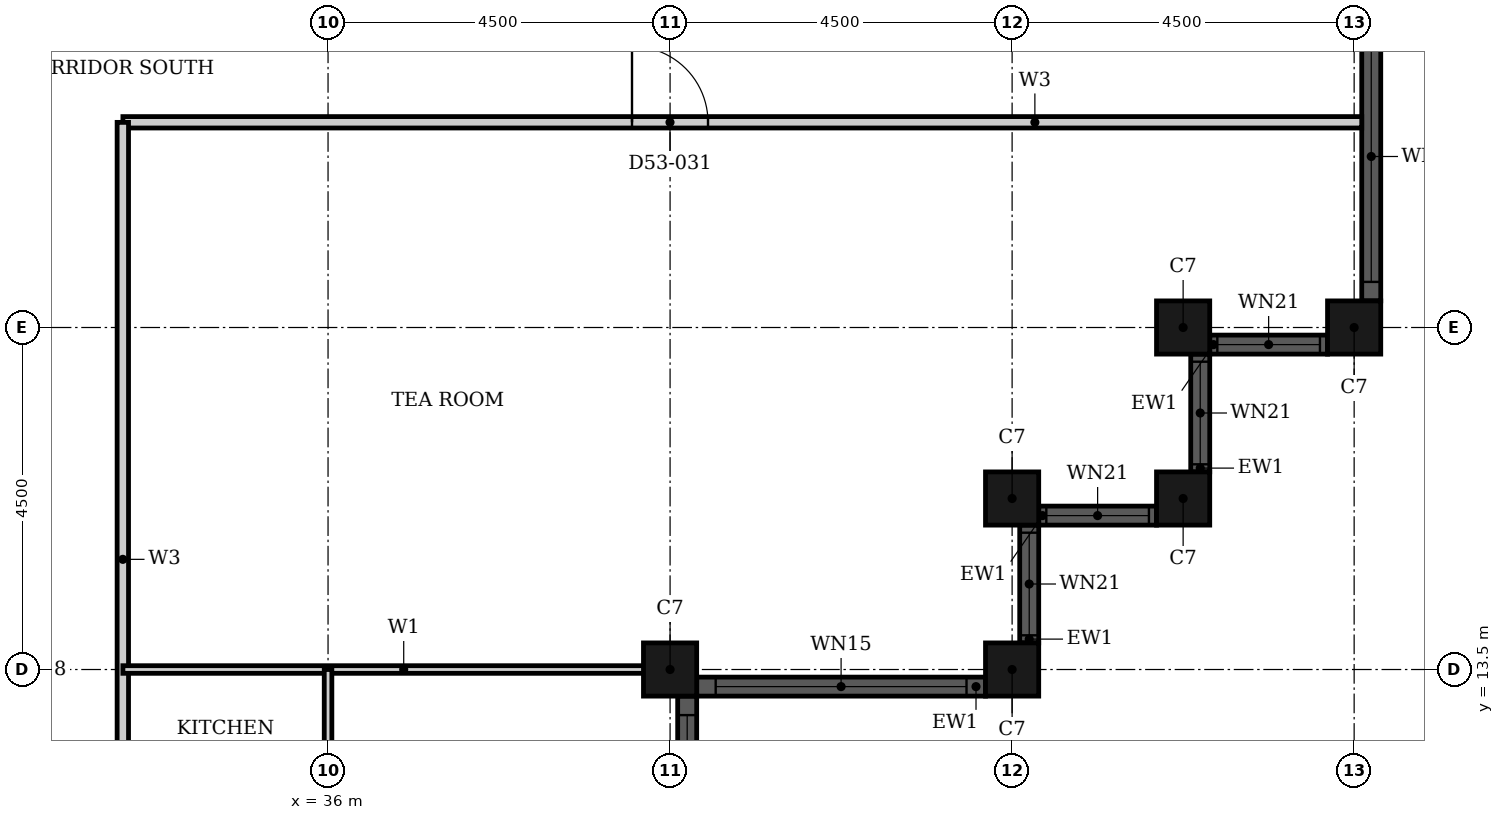
"""IFC4 building model, lengths in metres.
Left out: names, types, materials, properties, quantities, classifications, styles, units other than length and angle.
Written with IfcOpenShell. Run it as: python <this file> out.ifc"""

import sys

from ifc_helpers import new_model, si_unit, direction, frame, frame_2d, origin, origin_2d, place, context, subcontext, project, spatial, rectangle, hollow_rectangle, extrude, element, fill, save


model = new_model("IFC4")
c1 = context("Model", 3, precision=1e-05, world=origin(), true_north=direction((0.0, 1.0)))
c2 = subcontext(c1, "Body", "Model", "MODEL_VIEW")
j1 = project(units=[si_unit("LENGTHUNIT", "METRE"), si_unit("PLANEANGLEUNIT", "RADIAN")], contexts=[c1])
p1 = place(None, origin())
s1 = spatial("IfcSite", under=j1, at=p1, CompositionType="ELEMENT")
p2 = place(p1, origin())
s2 = spatial("IfcBuilding", under=s1, at=p2, CompositionType="ELEMENT")
p3 = place(p2, frame((0.0, 0.0, 210.9)))
s3 = spatial("IfcBuildingStorey", under=s2, at=p3, CompositionType="ELEMENT", Elevation=210.9)
for number, where, z_axis, x_axis in (
    (1, (40.5, 13.5, 0.0), (0.0, 0.0, 1.0), (1.0, 0.0, 0.0)),
    (2, (45.0, 13.5, 0.0), (0.0, 0.0, 1.0), (1.0, 0.0, 0.0)),
    (3, (45.0, 15.75, 0.0), (0.0, 0.0, 1.0), (1.0, 0.0, 0.0)),
    (4, (47.25, 15.75, 0.0), (0.0, 0.0, 1.0), (1.0, 0.0, 0.0)),
    (5, (47.25, 18.0, 0.0), (0.0, 0.0, 1.0), (1.0, 0.0, 0.0)),
    (6, (49.5, 18.0, 0.0), (0.0, 0.0, 1.0), (1.0, 0.0, 0.0)),
):
    element("IfcColumn", number, at=place(p3, frame(where, z_axis=z_axis, x_axis=x_axis)), inside=s3, PredefinedType="COLUMN", context=c2, shape_type="SweptSolid", body=[
        extrude(hollow_rectangle(XDim=0.7, YDim=0.7, WallThickness=0.022, at=origin_2d()), origin(), (0.0, 0.0, 1.0), 3.7),
    ])
p4 = place(p3, frame((40.85, 13.275, 0.0), z_axis=(0.0, 0.0, 1.0), x_axis=(1.0, 0.0, 0.0)))
e7 = element("IfcWall", 7, at=p4, inside=s3, PredefinedType="SOLIDWALL", context=c2, shape_type="SweptSolid", body=[
    extrude(rectangle(XDim=3.8, YDim=0.25, at=frame_2d((1.9, 0.0))), origin(), (0.0, 0.0, 1.0), 3.7),
])
p5 = place(p4, frame((0.25, 0.0, 0.45)))
e8 = element("IfcOpeningElement", 8, at=p5, cuts=e7, PredefinedType="OPENING", context=c2, shape_type="SweptSolid", body=[
    extrude(rectangle(XDim=3.3, YDim=2.3, at=frame_2d((1.65, 1.15))), frame((0.0, 0.135, 0.0), z_axis=(0.0, -1.0, 0.0), x_axis=(1.0, 0.0, 0.0)), (0.0, 0.0, 1.0), 0.27),
])
p6 = place(p3, frame((45.225, 13.85, 0.0), z_axis=(0.0, 0.0, 1.0), x_axis=(0.0, 1.0, 0.0)))
e9 = element("IfcWall", 9, at=p6, inside=s3, PredefinedType="SOLIDWALL", context=c2, shape_type="SweptSolid", body=[
    extrude(rectangle(XDim=1.55, YDim=0.25, at=frame_2d((0.775, 0.0))), origin(), (0.0, 0.0, 1.0), 3.7),
])
p7 = place(p6, frame((0.1, 0.0, 0.9)))
e10 = element("IfcOpeningElement", 10, at=p7, cuts=e9, PredefinedType="OPENING", context=c2, shape_type="SweptSolid", body=[
    extrude(rectangle(XDim=1.35, YDim=1.85, at=frame_2d((0.675, 0.925))), frame((0.0, 0.135, 0.0), z_axis=(0.0, -1.0, 0.0), x_axis=(1.0, 0.0, 0.0)), (0.0, 0.0, 1.0), 0.27),
])
p8 = place(p3, frame((45.35, 15.525, 0.0), z_axis=(0.0, 0.0, 1.0), x_axis=(1.0, 0.0, 0.0)))
e11 = element("IfcWall", 11, at=p8, inside=s3, PredefinedType="SOLIDWALL", context=c2, shape_type="SweptSolid", body=[
    extrude(rectangle(XDim=1.55, YDim=0.25, at=frame_2d((0.775, 0.0))), origin(), (0.0, 0.0, 1.0), 3.7),
])
p9 = place(p8, frame((0.1, 0.0, 0.9)))
e12 = element("IfcOpeningElement", 12, at=p9, cuts=e11, PredefinedType="OPENING", context=c2, shape_type="SweptSolid", body=[
    extrude(rectangle(XDim=1.35, YDim=1.85, at=frame_2d((0.675, 0.925))), frame((0.0, 0.135, 0.0), z_axis=(0.0, -1.0, 0.0), x_axis=(1.0, 0.0, 0.0)), (0.0, 0.0, 1.0), 0.27),
])
p10 = place(p3, frame((47.475, 16.1, 0.0), z_axis=(0.0, 0.0, 1.0), x_axis=(0.0, 1.0, 0.0)))
e13 = element("IfcWall", 13, at=p10, inside=s3, PredefinedType="SOLIDWALL", context=c2, shape_type="SweptSolid", body=[
    extrude(rectangle(XDim=1.55, YDim=0.25, at=frame_2d((0.775, 0.0))), origin(), (0.0, 0.0, 1.0), 3.7),
])
p11 = place(p10, frame((0.1, 0.0, 0.9)))
e14 = element("IfcOpeningElement", 14, at=p11, cuts=e13, PredefinedType="OPENING", context=c2, shape_type="SweptSolid", body=[
    extrude(rectangle(XDim=1.35, YDim=1.85, at=frame_2d((0.675, 0.925))), frame((0.0, 0.135, 0.0), z_axis=(0.0, -1.0, 0.0), x_axis=(1.0, 0.0, 0.0)), (0.0, 0.0, 1.0), 0.27),
])
p12 = place(p3, frame((47.6, 17.775, 0.0), z_axis=(0.0, 0.0, 1.0), x_axis=(1.0, 0.0, 0.0)))
e15 = element("IfcWall", 15, at=p12, inside=s3, PredefinedType="SOLIDWALL", context=c2, shape_type="SweptSolid", body=[
    extrude(rectangle(XDim=1.55, YDim=0.25, at=frame_2d((0.775, 0.0))), origin(), (0.0, 0.0, 1.0), 3.7),
])
p13 = place(p12, frame((0.1, 0.0, 0.9)))
e16 = element("IfcOpeningElement", 16, at=p13, cuts=e15, PredefinedType="OPENING", context=c2, shape_type="SweptSolid", body=[
    extrude(rectangle(XDim=1.35, YDim=1.85, at=frame_2d((0.675, 0.925))), frame((0.0, 0.135, 0.0), z_axis=(0.0, -1.0, 0.0), x_axis=(1.0, 0.0, 0.0)), (0.0, 0.0, 1.0), 0.27),
])
p14 = place(p3, frame((49.725, 18.35, 0.0), z_axis=(0.0, 0.0, 1.0), x_axis=(0.0, 1.0, 0.0)))
e17 = element("IfcWall", 17, at=p14, inside=s3, PredefinedType="SOLIDWALL", context=c2, shape_type="SweptSolid", body=[
    extrude(rectangle(XDim=8.3, YDim=0.25, at=frame_2d((4.15, 0.0))), origin(), (0.0, 0.0, 1.0), 3.7),
])
p15 = place(p14, frame((0.25, 0.0, 0.45)))
e18 = element("IfcOpeningElement", 18, at=p15, cuts=e17, PredefinedType="OPENING", context=c2, shape_type="SweptSolid", body=[
    extrude(rectangle(XDim=3.3, YDim=2.3, at=frame_2d((1.65, 1.15))), frame((0.0, 0.135, 0.0), z_axis=(0.0, -1.0, 0.0), x_axis=(1.0, 0.0, 0.0)), (0.0, 0.0, 1.0), 0.27),
])
p16 = place(p14, frame((4.75, 0.0, 0.45)))
e19 = element("IfcOpeningElement", 19, at=p16, cuts=e17, PredefinedType="OPENING", context=c2, shape_type="SweptSolid", body=[
    extrude(rectangle(XDim=3.3, YDim=2.3, at=frame_2d((1.65, 1.15))), frame((0.0, 0.135, 0.0), z_axis=(0.0, -1.0, 0.0), x_axis=(1.0, 0.0, 0.0)), (0.0, 0.0, 1.0), 0.27),
])
p17 = place(p3, frame((40.725, 4.85, 0.0), z_axis=(0.0, 0.0, 1.0), x_axis=(0.0, 1.0, 0.0)))
e20 = element("IfcWall", 20, at=p17, inside=s3, PredefinedType="SOLIDWALL", context=c2, shape_type="SweptSolid", body=[
    extrude(rectangle(XDim=8.3, YDim=0.25, at=frame_2d((4.15, 0.0))), origin(), (0.0, 0.0, 1.0), 3.7),
])
p18 = place(p17, frame((0.25, 0.0, 0.45)))
e21 = element("IfcOpeningElement", 21, at=p18, cuts=e20, PredefinedType="OPENING", context=c2, shape_type="SweptSolid", body=[
    extrude(rectangle(XDim=3.3, YDim=2.3, at=frame_2d((1.65, 1.15))), frame((0.0, 0.135, 0.0), z_axis=(0.0, -1.0, 0.0), x_axis=(1.0, 0.0, 0.0)), (0.0, 0.0, 1.0), 0.27),
])
p19 = place(p17, frame((4.75, 0.0, 0.45)))
e22 = element("IfcOpeningElement", 22, at=p19, cuts=e20, PredefinedType="OPENING", context=c2, shape_type="SweptSolid", body=[
    extrude(rectangle(XDim=3.3, YDim=2.3, at=frame_2d((1.65, 1.15))), frame((0.0, 0.135, 0.0), z_axis=(0.0, -1.0, 0.0), x_axis=(1.0, 0.0, 0.0)), (0.0, 0.0, 1.0), 0.27),
])
p20 = place(p3, frame((33.301, 20.7, 0.0), z_axis=(0.0, 0.0, 1.0), x_axis=(1.0, 0.0, 0.0)))
e23 = element("IfcWall", 23, at=p20, inside=s3, PredefinedType="PARTITIONING", context=c2, shape_type="SweptSolid", body=[
    extrude(rectangle(XDim=16.299, YDim=0.15, at=frame_2d((8.149, 0.0))), origin(), (0.0, 0.0, 1.0), 3.4),
])
p21 = place(p20, frame((6.698, 0.0, 0.0)))
e24 = element("IfcOpeningElement", 24, at=p21, cuts=e23, PredefinedType="OPENING", context=c2, shape_type="SweptSolid", body=[
    extrude(rectangle(XDim=1.0, YDim=2.1, at=frame_2d((0.5, 1.05))), frame((0.0, 0.085, 0.0), z_axis=(0.0, -1.0, 0.0), x_axis=(1.0, 0.0, 0.0)), (0.0, 0.0, 1.0), 0.17),
])
p22 = place(p3, frame((33.3, 6.9, 0.0), z_axis=(0.0, 0.0, 1.0), x_axis=(0.0, 1.0, 0.0)))
e25 = element("IfcWall", 25, at=p22, inside=s3, PredefinedType="PARTITIONING", context=c2, shape_type="SweptSolid", body=[
    extrude(rectangle(XDim=13.799, YDim=0.15, at=frame_2d((6.899, 0.0))), origin(), (0.0, 0.0, 1.0), 3.4),
])
p23 = place(p22, frame((1.3, 0.0, 0.0)))
e26 = element("IfcOpeningElement", 26, at=p23, cuts=e25, PredefinedType="OPENING", context=c2, shape_type="SweptSolid", body=[
    extrude(rectangle(XDim=1.0, YDim=2.2, at=frame_2d((0.5, 1.1))), frame((0.0, 0.085, 0.0), z_axis=(0.0, -1.0, 0.0), x_axis=(1.0, 0.0, 0.0)), (0.0, 0.0, 1.0), 0.17),
])
p24 = place(p3, frame((33.301, 13.5, 0.0), z_axis=(0.0, 0.0, 1.0), x_axis=(1.0, 0.0, 0.0)))
e27 = element("IfcWall", 27, at=p24, inside=s3, PredefinedType="PARTITIONING", context=c2, shape_type="SweptSolid", body=[
    extrude(rectangle(XDim=7.389, YDim=0.1, at=frame_2d((3.694, 0.0))), origin(), (0.0, 0.0, 1.0), 2.48),
])
p25 = place(p3, frame((36.0, 10.5, 0.0), z_axis=(0.0, 0.0, 1.0), x_axis=(0.0, 1.0, 0.0)))
e28 = element("IfcWall", 28, at=p25, inside=s3, PredefinedType="PARTITIONING", context=c2, shape_type="SweptSolid", body=[
    extrude(rectangle(XDim=3.0, YDim=0.1, at=frame_2d((1.5, 0.0))), origin(), (0.0, 0.0, 1.0), 2.68),
])
p26 = place(p25, frame((1.05, 0.0, 0.0)))
e29 = element("IfcOpeningElement", 29, at=p26, cuts=e28, PredefinedType="OPENING", context=c2, shape_type="SweptSolid", body=[
    extrude(rectangle(XDim=0.9, YDim=2.1, at=frame_2d((0.45, 1.05))), frame((0.0, 0.06, 0.0), z_axis=(0.0, -1.0, 0.0), x_axis=(1.0, 0.0, 0.0)), (0.0, 0.0, 1.0), 0.12),
])
p27 = place(p5, origin())
e30 = element("IfcWindow", 30, at=p27, inside=s3, PartitioningType="SINGLE_PANEL", PredefinedType="WINDOW", context=c2, shape_type="SweptSolid", body=[
    extrude(rectangle(XDim=3.3, YDim=2.3, at=frame_2d((1.65, 1.15))), frame((0.0, 0.03, 0.0), z_axis=(0.0, -1.0, 0.0), x_axis=(1.0, 0.0, 0.0)), (0.0, 0.0, 1.0), 0.06),
])
fill(e8, e30)
p28 = place(p7, origin())
e31 = element("IfcWindow", 31, at=p28, inside=s3, PartitioningType="SINGLE_PANEL", PredefinedType="WINDOW", context=c2, shape_type="SweptSolid", body=[
    extrude(rectangle(XDim=1.35, YDim=1.85, at=frame_2d((0.675, 0.925))), frame((0.0, 0.03, 0.0), z_axis=(0.0, -1.0, 0.0), x_axis=(1.0, 0.0, 0.0)), (0.0, 0.0, 1.0), 0.06),
])
fill(e10, e31)
p29 = place(p9, origin())
e32 = element("IfcWindow", 32, at=p29, inside=s3, PartitioningType="SINGLE_PANEL", PredefinedType="WINDOW", context=c2, shape_type="SweptSolid", body=[
    extrude(rectangle(XDim=1.35, YDim=1.85, at=frame_2d((0.675, 0.925))), frame((0.0, 0.03, 0.0), z_axis=(0.0, -1.0, 0.0), x_axis=(1.0, 0.0, 0.0)), (0.0, 0.0, 1.0), 0.06),
])
fill(e12, e32)
p30 = place(p11, origin())
e33 = element("IfcWindow", 33, at=p30, inside=s3, PartitioningType="SINGLE_PANEL", PredefinedType="WINDOW", context=c2, shape_type="SweptSolid", body=[
    extrude(rectangle(XDim=1.35, YDim=1.85, at=frame_2d((0.675, 0.925))), frame((0.0, 0.03, 0.0), z_axis=(0.0, -1.0, 0.0), x_axis=(1.0, 0.0, 0.0)), (0.0, 0.0, 1.0), 0.06),
])
fill(e14, e33)
p31 = place(p13, origin())
e34 = element("IfcWindow", 34, at=p31, inside=s3, PartitioningType="SINGLE_PANEL", PredefinedType="WINDOW", context=c2, shape_type="SweptSolid", body=[
    extrude(rectangle(XDim=1.35, YDim=1.85, at=frame_2d((0.675, 0.925))), frame((0.0, 0.03, 0.0), z_axis=(0.0, -1.0, 0.0), x_axis=(1.0, 0.0, 0.0)), (0.0, 0.0, 1.0), 0.06),
])
fill(e16, e34)
p32 = place(p15, origin())
e35 = element("IfcWindow", 35, at=p32, inside=s3, PartitioningType="SINGLE_PANEL", PredefinedType="WINDOW", context=c2, shape_type="SweptSolid", body=[
    extrude(rectangle(XDim=3.3, YDim=2.3, at=frame_2d((1.65, 1.15))), frame((0.0, 0.03, 0.0), z_axis=(0.0, -1.0, 0.0), x_axis=(1.0, 0.0, 0.0)), (0.0, 0.0, 1.0), 0.06),
])
fill(e18, e35)
p33 = place(p19, origin())
e36 = element("IfcWindow", 36, at=p33, inside=s3, PartitioningType="SINGLE_PANEL", PredefinedType="WINDOW", context=c2, shape_type="SweptSolid", body=[
    extrude(rectangle(XDim=3.3, YDim=2.3, at=frame_2d((1.65, 1.15))), frame((0.0, 0.03, 0.0), z_axis=(0.0, -1.0, 0.0), x_axis=(1.0, 0.0, 0.0)), (0.0, 0.0, 1.0), 0.06),
])
fill(e22, e36)
p34 = place(p21, origin())
e37 = element("IfcDoor", 37, at=p34, inside=s3, OperationType="SINGLE_SWING_RIGHT", PredefinedType="DOOR", context=c2, shape_type="SweptSolid", body=[
    extrude(rectangle(XDim=1.0, YDim=2.1, at=frame_2d((0.5, 1.05))), frame((0.0, 0.025, 0.0), z_axis=(0.0, -1.0, 0.0), x_axis=(1.0, 0.0, 0.0)), (0.0, 0.0, 1.0), 0.05),
])
fill(e24, e37)
save(model, sys.argv[1])
